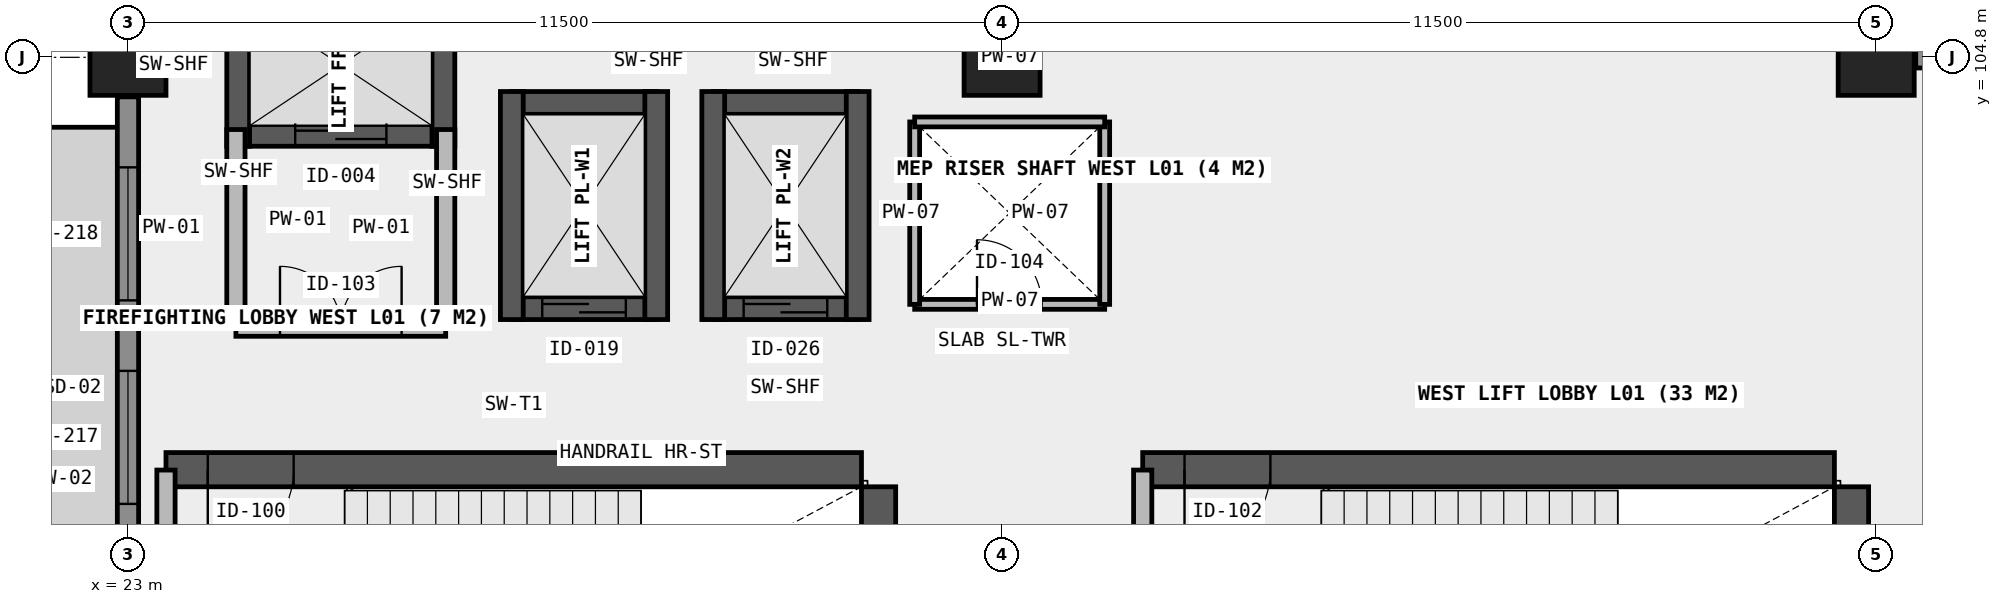
"""IFC4 building model, lengths in metres.
Left out: names, types, materials, properties, quantities, classifications, styles, units other than length and angle.
Written with IfcOpenShell. Run it as: python <this file> out.ifc"""

import sys

from ifc_helpers import new_model, si_unit, direction, frame, frame_2d, origin, origin_2d, place, context, subcontext, project, spatial, rectangle, extrude, element, fill, save


model = new_model("IFC4")
c1 = context("Model", 3, precision=1e-05, world=origin(), true_north=direction((0.0, 1.0)))
c2 = subcontext(c1, "Body", "Model", "MODEL_VIEW")
j1 = project(units=[si_unit("LENGTHUNIT", "METRE"), si_unit("PLANEANGLEUNIT", "RADIAN")], contexts=[c1])
p1 = place(None, origin())
s1 = spatial("IfcSite", under=j1, at=p1, CompositionType="ELEMENT")
p2 = place(p1, origin())
s2 = spatial("IfcBuilding", under=s1, at=p2, CompositionType="ELEMENT")
p3 = place(p2, frame((0.0, 0.0, 4.2)))
s3 = spatial("IfcBuildingStorey", under=s2, at=p3, CompositionType="ELEMENT", Elevation=4.2)
for number, where, z_axis, x_axis in (
    (1, (23.0, 104.8, 0.0), (0.0, 0.0, 1.0), (1.0, 0.0, 0.0)),
    (2, (34.5, 104.8, 0.0), (0.0, 0.0, 1.0), (1.0, 0.0, 0.0)),
    (3, (46.0, 104.8, 0.0), (0.0, 0.0, 1.0), (1.0, 0.0, 0.0)),
):
    element("IfcColumn", number, at=place(p3, frame(where, z_axis=z_axis, x_axis=x_axis)), inside=s3, PredefinedType="COLUMN", context=c2, shape_type="SweptSolid", body=[
        extrude(rectangle(XDim=1.0, YDim=1.0, at=origin_2d()), origin(), (0.0, 0.0, 1.0), 4.2),
    ])
p4 = place(p3, frame((24.45, 103.78, 0.0), z_axis=(0.0, 0.0, 1.0), x_axis=(1.0, 0.0, 0.0)))
e4 = element("IfcWall", 4, at=p4, inside=s3, PredefinedType="SHEAR", context=c2, shape_type="SweptSolid", body=[
    extrude(rectangle(XDim=2.7, YDim=0.3, at=frame_2d((1.35, 0.0))), origin(), (0.0, 0.0, 1.0), 4.2),
])
p5 = place(p4, frame((0.75, 0.0, 0.0)))
e5 = element("IfcOpeningElement", 5, at=p5, cuts=e4, PredefinedType="OPENING", context=c2, shape_type="SweptSolid", body=[
    extrude(rectangle(XDim=1.2, YDim=2.15, at=frame_2d((0.6, 1.075))), frame((0.0, 0.16, 0.0), z_axis=(0.0, -1.0, 0.0), x_axis=(1.0, 0.0, 0.0)), (0.0, 0.0, 1.0), 0.32),
])
for number, where, z_axis, x_axis in (
    (6, (24.45, 103.63, 0.0), (0.0, 0.0, 1.0), (0.0, 1.0, 0.0)),
    (7, (27.15, 103.63, 0.0), (0.0, 0.0, 1.0), (0.0, 1.0, 0.0)),
):
    element("IfcWall", number, at=place(p3, frame(where, z_axis=z_axis, x_axis=x_axis)), inside=s3, PredefinedType="SHEAR", context=c2, shape_type="SweptSolid", body=[
        extrude(rectangle(XDim=2.14, YDim=0.3, at=frame_2d((1.07, 0.0))), origin(), (0.0, 0.0, 1.0), 4.2),
    ])
p6 = place(p3, frame((28.05, 101.5, 0.0), z_axis=(0.0, 0.0, 1.0), x_axis=(1.0, 0.0, 0.0)))
e8 = element("IfcWall", 8, at=p6, inside=s3, PredefinedType="SHEAR", context=c2, shape_type="SweptSolid", body=[
    extrude(rectangle(XDim=1.9, YDim=0.3, at=frame_2d((0.95, 0.0))), origin(), (0.0, 0.0, 1.0), 4.2),
])
p7 = place(p6, frame((0.4, 0.0, 0.0)))
e9 = element("IfcOpeningElement", 9, at=p7, cuts=e8, PredefinedType="OPENING", context=c2, shape_type="SweptSolid", body=[
    extrude(rectangle(XDim=1.1, YDim=2.15, at=frame_2d((0.55, 1.075))), frame((0.0, 0.16, 0.0), z_axis=(0.0, -1.0, 0.0), x_axis=(1.0, 0.0, 0.0)), (0.0, 0.0, 1.0), 0.32),
])
p8 = place(p3, frame((28.05, 104.2, 0.0), z_axis=(0.0, 0.0, 1.0), x_axis=(1.0, 0.0, 0.0)))
e10 = element("IfcWall", 10, at=p8, inside=s3, PredefinedType="SHEAR", context=c2, shape_type="SweptSolid", body=[
    extrude(rectangle(XDim=1.9, YDim=0.3, at=frame_2d((0.95, 0.0))), origin(), (0.0, 0.0, 1.0), 4.2),
])
for number, where, z_axis, x_axis in (
    (11, (28.05, 101.35, 0.0), (0.0, 0.0, 1.0), (0.0, 1.0, 0.0)),
    (12, (29.95, 101.35, 0.0), (0.0, 0.0, 1.0), (0.0, 1.0, 0.0)),
):
    element("IfcWall", number, at=place(p3, frame(where, z_axis=z_axis, x_axis=x_axis)), inside=s3, PredefinedType="SHEAR", context=c2, shape_type="SweptSolid", body=[
        extrude(rectangle(XDim=3.0, YDim=0.3, at=frame_2d((1.5, 0.0))), origin(), (0.0, 0.0, 1.0), 4.2),
    ])
p9 = place(p3, frame((30.7, 101.5, 0.0), z_axis=(0.0, 0.0, 1.0), x_axis=(1.0, 0.0, 0.0)))
e13 = element("IfcWall", 13, at=p9, inside=s3, PredefinedType="SHEAR", context=c2, shape_type="SweptSolid", body=[
    extrude(rectangle(XDim=1.9, YDim=0.3, at=frame_2d((0.95, 0.0))), origin(), (0.0, 0.0, 1.0), 4.2),
])
p10 = place(p9, frame((0.4, 0.0, 0.0)))
e14 = element("IfcOpeningElement", 14, at=p10, cuts=e13, PredefinedType="OPENING", context=c2, shape_type="SweptSolid", body=[
    extrude(rectangle(XDim=1.1, YDim=2.15, at=frame_2d((0.55, 1.075))), frame((0.0, 0.16, 0.0), z_axis=(0.0, -1.0, 0.0), x_axis=(1.0, 0.0, 0.0)), (0.0, 0.0, 1.0), 0.32),
])
p11 = place(p3, frame((30.7, 104.2, 0.0), z_axis=(0.0, 0.0, 1.0), x_axis=(1.0, 0.0, 0.0)))
e15 = element("IfcWall", 15, at=p11, inside=s3, PredefinedType="SHEAR", context=c2, shape_type="SweptSolid", body=[
    extrude(rectangle(XDim=1.9, YDim=0.3, at=frame_2d((0.95, 0.0))), origin(), (0.0, 0.0, 1.0), 4.2),
])
for number, where, z_axis, x_axis in (
    (16, (30.7, 101.35, 0.0), (0.0, 0.0, 1.0), (0.0, 1.0, 0.0)),
    (17, (32.6, 101.35, 0.0), (0.0, 0.0, 1.0), (0.0, 1.0, 0.0)),
):
    element("IfcWall", number, at=place(p3, frame(where, z_axis=z_axis, x_axis=x_axis)), inside=s3, PredefinedType="SHEAR", context=c2, shape_type="SweptSolid", body=[
        extrude(rectangle(XDim=3.0, YDim=0.3, at=frame_2d((1.5, 0.0))), origin(), (0.0, 0.0, 1.0), 4.2),
    ])
p12 = place(p3, frame((23.5, 99.375, 0.0), z_axis=(0.0, 0.0, 1.0), x_axis=(1.0, 0.0, 0.0)))
e18 = element("IfcWall", 18, at=p12, inside=s3, PredefinedType="SHEAR", context=c2, shape_type="SweptSolid", body=[
    extrude(rectangle(XDim=9.15, YDim=0.45, at=frame_2d((4.575, 0.0))), origin(), (0.0, 0.0, 1.0), 4.2),
])
p13 = place(p12, frame((0.55, 0.0, 0.0)))
e19 = element("IfcOpeningElement", 19, at=p13, cuts=e18, PredefinedType="OPENING", context=c2, shape_type="SweptSolid", body=[
    extrude(rectangle(XDim=1.13, YDim=2.15, at=frame_2d((0.565, 1.075))), frame((0.0, 0.235, 0.0), z_axis=(0.0, -1.0, 0.0), x_axis=(1.0, 0.0, 0.0)), (0.0, 0.0, 1.0), 0.47),
])
p14 = place(p3, frame((32.875, 95.55, 0.0), z_axis=(0.0, 0.0, 1.0), x_axis=(0.0, 1.0, 0.0)))
e20 = element("IfcWall", 20, at=p14, inside=s3, PredefinedType="SHEAR", context=c2, shape_type="SweptSolid", body=[
    extrude(rectangle(XDim=3.6, YDim=0.45, at=frame_2d((1.8, 0.0))), origin(), (0.0, 0.0, 1.0), 4.2),
])
p15 = place(p3, frame((36.35, 99.375, 0.0), z_axis=(0.0, 0.0, 1.0), x_axis=(1.0, 0.0, 0.0)))
e21 = element("IfcWall", 21, at=p15, inside=s3, PredefinedType="SHEAR", context=c2, shape_type="SweptSolid", body=[
    extrude(rectangle(XDim=9.1, YDim=0.45, at=frame_2d((4.55, 0.0))), origin(), (0.0, 0.0, 1.0), 4.2),
])
p16 = place(p15, frame((0.55, 0.0, 0.0)))
e22 = element("IfcOpeningElement", 22, at=p16, cuts=e21, PredefinedType="OPENING", context=c2, shape_type="SweptSolid", body=[
    extrude(rectangle(XDim=1.13, YDim=2.15, at=frame_2d((0.565, 1.075))), frame((0.0, 0.235, 0.0), z_axis=(0.0, -1.0, 0.0), x_axis=(1.0, 0.0, 0.0)), (0.0, 0.0, 1.0), 0.47),
])
p17 = place(p3, frame((45.675, 95.32, 0.0), z_axis=(0.0, 0.0, 1.0), x_axis=(0.0, 1.0, 0.0)))
e23 = element("IfcWall", 23, at=p17, inside=s3, PredefinedType="SHEAR", context=c2, shape_type="SweptSolid", body=[
    extrude(rectangle(XDim=3.83, YDim=0.45, at=frame_2d((1.915, 0.0))), origin(), (0.0, 0.0, 1.0), 4.2),
])
p18 = place(p3, frame((46.52, 104.8, 0.0), z_axis=(0.0, 0.0, 1.0), x_axis=(1.0, 0.0, 0.0)))
e24 = element("IfcWall", 24, at=p18, inside=s3, PredefinedType="SOLIDWALL", context=c2, shape_type="SweptSolid", body=[
    extrude(rectangle(XDim=10.46, YDim=0.28, at=frame_2d((5.23, 0.0))), origin(), (0.0, 0.0, 1.0), 3.15),
])
p19 = place(p18, frame((1.302, 0.0, 0.85)))
e25 = element("IfcOpeningElement", 25, at=p19, cuts=e24, PredefinedType="OPENING", context=c2, shape_type="SweptSolid", body=[
    extrude(rectangle(XDim=1.75, YDim=1.95, at=frame_2d((0.875, 0.975))), frame((0.0, 0.15, 0.0), z_axis=(0.0, -1.0, 0.0), x_axis=(1.0, 0.0, 0.0)), (0.0, 0.0, 1.0), 0.3),
])
p20 = place(p18, frame((4.355, 0.0, 0.85)))
e26 = element("IfcOpeningElement", 26, at=p20, cuts=e24, PredefinedType="OPENING", context=c2, shape_type="SweptSolid", body=[
    extrude(rectangle(XDim=1.75, YDim=1.95, at=frame_2d((0.875, 0.975))), frame((0.0, 0.15, 0.0), z_axis=(0.0, -1.0, 0.0), x_axis=(1.0, 0.0, 0.0)), (0.0, 0.0, 1.0), 0.3),
])
p21 = place(p18, frame((7.407, 0.0, 0.85)))
e27 = element("IfcOpeningElement", 27, at=p21, cuts=e24, PredefinedType="OPENING", context=c2, shape_type="SweptSolid", body=[
    extrude(rectangle(XDim=1.75, YDim=1.95, at=frame_2d((0.875, 0.975))), frame((0.0, 0.15, 0.0), z_axis=(0.0, -1.0, 0.0), x_axis=(1.0, 0.0, 0.0)), (0.0, 0.0, 1.0), 0.3),
])
p22 = place(p3, frame((23.0, 95.32, 0.0), z_axis=(0.0, 0.0, 1.0), x_axis=(0.0, 1.0, 0.0)))
e28 = element("IfcWall", 28, at=p22, inside=s3, PredefinedType="SOLIDWALL", context=c2, shape_type="SweptSolid", body=[
    extrude(rectangle(XDim=8.96, YDim=0.28, at=frame_2d((4.48, 0.0))), origin(), (0.0, 0.0, 1.0), 3.15),
])
p23 = place(p22, frame((0.927, 0.0, 0.85)))
e29 = element("IfcOpeningElement", 29, at=p23, cuts=e28, PredefinedType="OPENING", context=c2, shape_type="SweptSolid", body=[
    extrude(rectangle(XDim=1.75, YDim=1.95, at=frame_2d((0.875, 0.975))), frame((0.0, 0.15, 0.0), z_axis=(0.0, -1.0, 0.0), x_axis=(1.0, 0.0, 0.0)), (0.0, 0.0, 1.0), 0.3),
])
p24 = place(p22, frame((3.605, 0.0, 0.85)))
e30 = element("IfcOpeningElement", 30, at=p24, cuts=e28, PredefinedType="OPENING", context=c2, shape_type="SweptSolid", body=[
    extrude(rectangle(XDim=1.75, YDim=1.95, at=frame_2d((0.875, 0.975))), frame((0.0, 0.15, 0.0), z_axis=(0.0, -1.0, 0.0), x_axis=(1.0, 0.0, 0.0)), (0.0, 0.0, 1.0), 0.3),
])
p25 = place(p22, frame((6.282, 0.0, 0.85)))
e31 = element("IfcOpeningElement", 31, at=p25, cuts=e28, PredefinedType="OPENING", context=c2, shape_type="SweptSolid", body=[
    extrude(rectangle(XDim=1.75, YDim=1.95, at=frame_2d((0.875, 0.975))), frame((0.0, 0.15, 0.0), z_axis=(0.0, -1.0, 0.0), x_axis=(1.0, 0.0, 0.0)), (0.0, 0.0, 1.0), 0.3),
])
p26 = place(p3, frame((23.5, 95.33, 0.0), z_axis=(0.0, 0.0, 1.0), x_axis=(0.0, 1.0, 0.0)))
e32 = element("IfcWall", 32, at=p26, inside=s3, PredefinedType="SOLIDWALL", context=c2, shape_type="SweptSolid", body=[
    extrude(rectangle(XDim=4.04, YDim=0.24, at=frame_2d((2.02, 0.0))), origin(), (0.0, 0.0, 1.0), 3.84),
])
p27 = place(p26, frame((1.45, 0.0, 0.0)))
e33 = element("IfcOpeningElement", 33, at=p27, cuts=e32, PredefinedType="OPENING", context=c2, shape_type="SweptSolid", body=[
    extrude(rectangle(XDim=1.13, YDim=2.15, at=frame_2d((0.565, 1.075))), frame((0.0, 0.13, 0.0), z_axis=(0.0, -1.0, 0.0), x_axis=(1.0, 0.0, 0.0)), (0.0, 0.0, 1.0), 0.26),
])
p28 = place(p3, frame((36.35, 95.33, 0.0), z_axis=(0.0, 0.0, 1.0), x_axis=(0.0, 1.0, 0.0)))
e34 = element("IfcWall", 34, at=p28, inside=s3, PredefinedType="SOLIDWALL", context=c2, shape_type="SweptSolid", body=[
    extrude(rectangle(XDim=4.04, YDim=0.24, at=frame_2d((2.02, 0.0))), origin(), (0.0, 0.0, 1.0), 3.84),
])
p29 = place(p28, frame((1.45, 0.0, 0.0)))
e35 = element("IfcOpeningElement", 35, at=p29, cuts=e34, PredefinedType="OPENING", context=c2, shape_type="SweptSolid", body=[
    extrude(rectangle(XDim=1.13, YDim=2.15, at=frame_2d((0.565, 1.075))), frame((0.0, 0.13, 0.0), z_axis=(0.0, -1.0, 0.0), x_axis=(1.0, 0.0, 0.0)), (0.0, 0.0, 1.0), 0.26),
])
p30 = place(p3, frame((24.42, 101.25, 0.0), z_axis=(0.0, 0.0, 1.0), x_axis=(1.0, 0.0, 0.0)))
e36 = element("IfcWall", 36, at=p30, inside=s3, PredefinedType="SOLIDWALL", context=c2, shape_type="SweptSolid", body=[
    extrude(rectangle(XDim=2.76, YDim=0.24, at=frame_2d((1.38, 0.0))), origin(), (0.0, 0.0, 1.0), 3.84),
])
p31 = place(p30, frame((0.58, 0.0, 0.0)))
e37 = element("IfcOpeningElement", 37, at=p31, cuts=e36, PredefinedType="OPENING", context=c2, shape_type="SweptSolid", body=[
    extrude(rectangle(XDim=1.6, YDim=2.15, at=frame_2d((0.8, 1.075))), frame((0.0, 0.13, 0.0), z_axis=(0.0, -1.0, 0.0), x_axis=(1.0, 0.0, 0.0)), (0.0, 0.0, 1.0), 0.26),
])
for number, where, z_axis, x_axis in (
    (38, (24.42, 101.25, 0.0), (0.0, 0.0, 1.0), (0.0, 1.0, 0.0)),
    (39, (27.18, 101.25, 0.0), (0.0, 0.0, 1.0), (0.0, 1.0, 0.0)),
):
    element("IfcWall", number, at=place(p3, frame(where, z_axis=z_axis, x_axis=x_axis)), inside=s3, PredefinedType="SOLIDWALL", context=c2, shape_type="SweptSolid", body=[
        extrude(rectangle(XDim=2.6, YDim=0.24, at=frame_2d((1.3, 0.0))), origin(), (0.0, 0.0, 1.0), 3.84),
    ])
p32 = place(p3, frame((33.35, 101.55, 0.0), z_axis=(0.0, 0.0, 1.0), x_axis=(1.0, 0.0, 0.0)))
e40 = element("IfcWall", 40, at=p32, inside=s3, PredefinedType="PLUMBINGWALL", context=c2, shape_type="SweptSolid", body=[
    extrude(rectangle(XDim=2.5, YDim=0.13, at=frame_2d((1.25, 0.0))), origin(), (0.0, 0.0, 1.0), 3.84),
])
p33 = place(p32, frame((0.82, 0.0, 0.0)))
e41 = element("IfcOpeningElement", 41, at=p33, cuts=e40, PredefinedType="OPENING", context=c2, shape_type="SweptSolid", body=[
    extrude(rectangle(XDim=0.85, YDim=2.0, at=frame_2d((0.425, 1.0))), frame((0.0, 0.075, 0.0), z_axis=(0.0, -1.0, 0.0), x_axis=(1.0, 0.0, 0.0)), (0.0, 0.0, 1.0), 0.15),
])
for number, where, z_axis, x_axis in (
    (42, (33.35, 101.55, 0.0), (0.0, 0.0, 1.0), (0.0, 1.0, 0.0)),
    (43, (35.85, 101.55, 0.0), (0.0, 0.0, 1.0), (0.0, 1.0, 0.0)),
):
    element("IfcWall", number, at=place(p3, frame(where, z_axis=z_axis, x_axis=x_axis)), inside=s3, PredefinedType="PLUMBINGWALL", context=c2, shape_type="SweptSolid", body=[
        extrude(rectangle(XDim=2.4, YDim=0.13, at=frame_2d((1.2, 0.0))), origin(), (0.0, 0.0, 1.0), 3.84),
    ])
p34 = place(p3, frame((33.35, 103.95, 0.0), z_axis=(0.0, 0.0, 1.0), x_axis=(1.0, 0.0, 0.0)))
e44 = element("IfcWall", 44, at=p34, inside=s3, PredefinedType="PLUMBINGWALL", context=c2, shape_type="SweptSolid", body=[
    extrude(rectangle(XDim=2.5, YDim=0.13, at=frame_2d((1.25, 0.0))), origin(), (0.0, 0.0, 1.0), 3.84),
])
p35 = place(p24, origin())
e45 = element("IfcWindow", 45, at=p35, inside=s3, PartitioningType="SINGLE_PANEL", PredefinedType="WINDOW", context=c2, shape_type="SweptSolid", body=[
    extrude(rectangle(XDim=1.75, YDim=1.95, at=frame_2d((0.875, 0.975))), frame((0.0, 0.03, 0.0), z_axis=(0.0, -1.0, 0.0), x_axis=(1.0, 0.0, 0.0)), (0.0, 0.0, 1.0), 0.06),
])
fill(e30, e45)
p36 = place(p25, origin())
e46 = element("IfcWindow", 46, at=p36, inside=s3, PartitioningType="SINGLE_PANEL", PredefinedType="WINDOW", context=c2, shape_type="SweptSolid", body=[
    extrude(rectangle(XDim=1.75, YDim=1.95, at=frame_2d((0.875, 0.975))), frame((0.0, 0.03, 0.0), z_axis=(0.0, -1.0, 0.0), x_axis=(1.0, 0.0, 0.0)), (0.0, 0.0, 1.0), 0.06),
])
fill(e31, e46)
p37 = place(p5, origin())
e47 = element("IfcDoor", 47, at=p37, inside=s3, OperationType="SLIDING_TO_RIGHT", PredefinedType="DOOR", context=c2, shape_type="SweptSolid", body=[
    extrude(rectangle(XDim=1.2, YDim=2.15, at=frame_2d((0.6, 1.075))), frame((0.0, 0.025, 0.0), z_axis=(0.0, -1.0, 0.0), x_axis=(1.0, 0.0, 0.0)), (0.0, 0.0, 1.0), 0.05),
])
fill(e5, e47)
p38 = place(p7, origin())
e48 = element("IfcDoor", 48, at=p38, inside=s3, OperationType="SLIDING_TO_LEFT", PredefinedType="DOOR", context=c2, shape_type="SweptSolid", body=[
    extrude(rectangle(XDim=1.1, YDim=2.15, at=frame_2d((0.55, 1.075))), frame((0.0, 0.025, 0.0), z_axis=(0.0, -1.0, 0.0), x_axis=(1.0, 0.0, 0.0)), (0.0, 0.0, 1.0), 0.05),
])
fill(e9, e48)
p39 = place(p10, origin())
e49 = element("IfcDoor", 49, at=p39, inside=s3, OperationType="SLIDING_TO_LEFT", PredefinedType="DOOR", context=c2, shape_type="SweptSolid", body=[
    extrude(rectangle(XDim=1.1, YDim=2.15, at=frame_2d((0.55, 1.075))), frame((0.0, 0.025, 0.0), z_axis=(0.0, -1.0, 0.0), x_axis=(1.0, 0.0, 0.0)), (0.0, 0.0, 1.0), 0.05),
])
fill(e14, e49)
p40 = place(p13, frame((0.565, 0.0, 0.0), z_axis=(0.0, 0.0, 1.0), x_axis=(-1.0, 0.0, 0.0)))
e50 = element("IfcDoor", 50, at=p40, inside=s3, OperationType="SINGLE_SWING_LEFT", PredefinedType="DOOR", context=c2, shape_type="SweptSolid", body=[
    extrude(rectangle(XDim=1.13, YDim=2.15, at=frame_2d((0.0, 1.075))), frame((0.0, 0.025, 0.0), z_axis=(0.0, -1.0, 0.0), x_axis=(1.0, 0.0, 0.0)), (0.0, 0.0, 1.0), 0.05),
])
fill(e19, e50)
p41 = place(p16, frame((0.565, 0.0, 0.0), z_axis=(0.0, 0.0, 1.0), x_axis=(-1.0, 0.0, 0.0)))
e51 = element("IfcDoor", 51, at=p41, inside=s3, OperationType="SINGLE_SWING_LEFT", PredefinedType="DOOR", context=c2, shape_type="SweptSolid", body=[
    extrude(rectangle(XDim=1.13, YDim=2.15, at=frame_2d((0.0, 1.075))), frame((0.0, 0.025, 0.0), z_axis=(0.0, -1.0, 0.0), x_axis=(1.0, 0.0, 0.0)), (0.0, 0.0, 1.0), 0.05),
])
fill(e22, e51)
p42 = place(p31, origin())
e52 = element("IfcDoor", 52, at=p42, inside=s3, OperationType="DOUBLE_DOOR_SINGLE_SWING", PredefinedType="DOOR", context=c2, shape_type="SweptSolid", body=[
    extrude(rectangle(XDim=1.6, YDim=2.15, at=frame_2d((0.8, 1.075))), frame((0.0, 0.025, 0.0), z_axis=(0.0, -1.0, 0.0), x_axis=(1.0, 0.0, 0.0)), (0.0, 0.0, 1.0), 0.05),
])
fill(e37, e52)
p43 = place(p33, origin())
e53 = element("IfcDoor", 53, at=p43, inside=s3, OperationType="SINGLE_SWING_LEFT", PredefinedType="TRAPDOOR", context=c2, shape_type="SweptSolid", body=[
    extrude(rectangle(XDim=0.85, YDim=2.0, at=frame_2d((0.425, 1.0))), frame((0.0, 0.025, 0.0), z_axis=(0.0, -1.0, 0.0), x_axis=(1.0, 0.0, 0.0)), (0.0, 0.0, 1.0), 0.05),
])
fill(e41, e53)
save(model, sys.argv[1])
